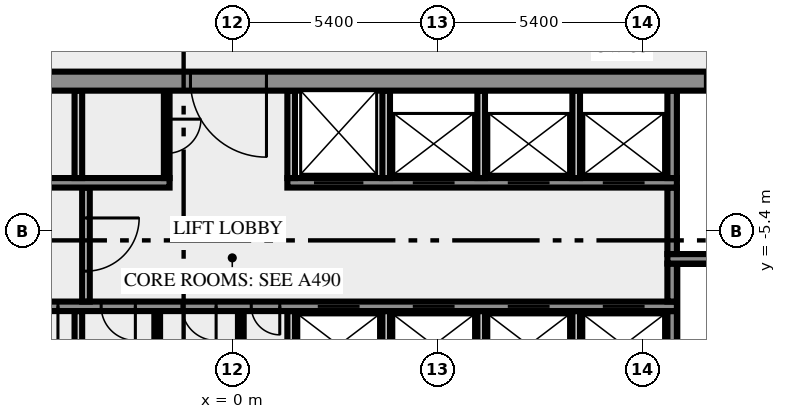
"""IFC4 building model, lengths in metres.
Left out: names, types, materials, properties, quantities, classifications, styles, units other than length and angle.
Written with IfcOpenShell. Run it as: python <this file> out.ifc"""

import sys

from ifc_helpers import new_model, si_unit, direction, frame, frame_2d, origin, place, context, subcontext, project, spatial, rectangle, extrude, element, fill, save


model = new_model("IFC4")
c1 = context("Model", 3, precision=1e-05, world=origin(), true_north=direction((0.0, 1.0)))
c2 = subcontext(c1, "Body", "Model", "MODEL_VIEW")
j1 = project(units=[si_unit("LENGTHUNIT", "METRE"), si_unit("PLANEANGLEUNIT", "RADIAN")], contexts=[c1])
p1 = place(None, origin())
s1 = spatial("IfcSite", under=j1, at=p1, CompositionType="ELEMENT")
p2 = place(p1, origin())
s2 = spatial("IfcBuilding", under=s1, at=p2, CompositionType="ELEMENT")
p3 = place(p2, frame((0.0, 0.0, 194.0)))
s3 = spatial("IfcBuildingStorey", under=s2, at=p3, CompositionType="ELEMENT", Elevation=194.0)
p4 = place(p3, frame((-4.05, -10.5, 0.0), z_axis=(0.0, 0.0, 1.0), x_axis=(0.0, 1.0, 0.0)))
e1 = element("IfcWall", 1, at=p4, inside=s3, PredefinedType="SOLIDWALL", context=c2, shape_type="SweptSolid", body=[
    extrude(rectangle(XDim=3.0, YDim=0.2, at=frame_2d((1.5, 0.0))), origin(), (0.0, 0.0, 1.0), 3.65),
])
for number, where, z_axis, x_axis in (
    (2, (-1.975, -10.5, 0.0), (0.0, 0.0, 1.0), (0.0, 1.0, 0.0)),
    (3, (0.225, -10.5, 0.0), (0.0, 0.0, 1.0), (0.0, 1.0, 0.0)),
):
    element("IfcWall", number, at=place(p3, frame(where, z_axis=z_axis, x_axis=x_axis)), inside=s3, PredefinedType="PARTITIONING", context=c2, shape_type="SweptSolid", body=[
        extrude(rectangle(XDim=3.0, YDim=0.15, at=frame_2d((1.5, 0.0))), origin(), (0.0, 0.0, 1.0), 3.65),
    ])
for number, where, z_axis, x_axis in (
    (4, (1.55, -10.5, 0.0), (0.0, 0.0, 1.0), (0.0, 1.0, 0.0)),
    (5, (4.05, -10.5, 0.0), (0.0, 0.0, 1.0), (0.0, 1.0, 0.0)),
    (6, (6.55, -10.5, 0.0), (0.0, 0.0, 1.0), (0.0, 1.0, 0.0)),
    (7, (9.05, -10.5, 0.0), (0.0, 0.0, 1.0), (0.0, 1.0, 0.0)),
):
    element("IfcWall", number, at=place(p3, frame(where, z_axis=z_axis, x_axis=x_axis)), inside=s3, PredefinedType="SOLIDWALL", context=c2, shape_type="SweptSolid", body=[
        extrude(rectangle(XDim=3.0, YDim=0.2, at=frame_2d((1.5, 0.0))), origin(), (0.0, 0.0, 1.0), 3.65),
    ])
p5 = place(p3, frame((11.575, -10.5, 0.0), z_axis=(0.0, 0.0, 1.0), x_axis=(0.0, 1.0, 0.0)))
e8 = element("IfcWall", 8, at=p5, inside=s3, PredefinedType="SHEAR", context=c2, shape_type="SweptSolid", body=[
    extrude(rectangle(XDim=3.0, YDim=0.25, at=frame_2d((1.5, 0.0))), origin(), (0.0, 0.0, 1.0), 3.65),
])
p6 = place(p3, frame((11.7, -7.375, 0.0), z_axis=(0.0, 0.0, 1.0), x_axis=(-1.0, 0.0, 0.0)))
e9 = element("IfcWall", 9, at=p6, inside=s3, PredefinedType="SHEAR", context=c2, shape_type="SweptSolid", body=[
    extrude(rectangle(XDim=23.4, YDim=0.25, at=frame_2d((11.7, 0.0))), origin(), (0.0, 0.0, 1.0), 3.65),
])
p7 = place(p6, frame((22.012, 0.0, 0.0)))
e10 = element("IfcOpeningElement", 10, at=p7, cuts=e9, PredefinedType="OPENING", context=c2, shape_type="SweptSolid", body=[
    extrude(rectangle(XDim=0.9, YDim=2.1, at=frame_2d((0.45, 1.05))), frame((0.0, 0.135, 0.0), z_axis=(0.0, -1.0, 0.0), x_axis=(1.0, 0.0, 0.0)), (0.0, 0.0, 1.0), 0.27),
])
p8 = place(p6, frame((20.25, 0.0, 0.0)))
e11 = element("IfcOpeningElement", 11, at=p8, cuts=e9, PredefinedType="OPENING", context=c2, shape_type="SweptSolid", body=[
    extrude(rectangle(XDim=0.9, YDim=2.1, at=frame_2d((0.45, 1.05))), frame((0.0, 0.135, 0.0), z_axis=(0.0, -1.0, 0.0), x_axis=(1.0, 0.0, 0.0)), (0.0, 0.0, 1.0), 0.27),
])
p9 = place(p6, frame((18.25, 0.0, 0.0)))
e12 = element("IfcOpeningElement", 12, at=p9, cuts=e9, PredefinedType="OPENING", context=c2, shape_type="SweptSolid", body=[
    extrude(rectangle(XDim=0.9, YDim=2.1, at=frame_2d((0.45, 1.05))), frame((0.0, 0.135, 0.0), z_axis=(0.0, -1.0, 0.0), x_axis=(1.0, 0.0, 0.0)), (0.0, 0.0, 1.0), 0.27),
])
p10 = place(p6, frame((16.287, 0.0, 0.0)))
e13 = element("IfcOpeningElement", 13, at=p10, cuts=e9, PredefinedType="OPENING", context=c2, shape_type="SweptSolid", body=[
    extrude(rectangle(XDim=0.9, YDim=2.1, at=frame_2d((0.45, 1.05))), frame((0.0, 0.135, 0.0), z_axis=(0.0, -1.0, 0.0), x_axis=(1.0, 0.0, 0.0)), (0.0, 0.0, 1.0), 0.27),
])
p11 = place(p6, frame((14.25, 0.0, 0.0)))
e14 = element("IfcOpeningElement", 14, at=p11, cuts=e9, PredefinedType="OPENING", context=c2, shape_type="SweptSolid", body=[
    extrude(rectangle(XDim=0.9, YDim=2.1, at=frame_2d((0.45, 1.05))), frame((0.0, 0.135, 0.0), z_axis=(0.0, -1.0, 0.0), x_axis=(1.0, 0.0, 0.0)), (0.0, 0.0, 1.0), 0.27),
])
p12 = place(p6, frame((12.125, 0.0, 0.0)))
e15 = element("IfcOpeningElement", 15, at=p12, cuts=e9, PredefinedType="OPENING", context=c2, shape_type="SweptSolid", body=[
    extrude(rectangle(XDim=0.9, YDim=2.1, at=frame_2d((0.45, 1.05))), frame((0.0, 0.135, 0.0), z_axis=(0.0, -1.0, 0.0), x_axis=(1.0, 0.0, 0.0)), (0.0, 0.0, 1.0), 0.27),
])
p13 = place(p6, frame((10.45, 0.0, 0.0)))
e16 = element("IfcOpeningElement", 16, at=p13, cuts=e9, PredefinedType="OPENING", context=c2, shape_type="SweptSolid", body=[
    extrude(rectangle(XDim=0.75, YDim=2.1, at=frame_2d((0.375, 1.05))), frame((0.0, 0.135, 0.0), z_axis=(0.0, -1.0, 0.0), x_axis=(1.0, 0.0, 0.0)), (0.0, 0.0, 1.0), 0.27),
])
p14 = place(p6, frame((8.35, 0.0, 0.0)))
e17 = element("IfcOpeningElement", 17, at=p14, cuts=e9, PredefinedType="OPENING", context=c2, shape_type="SweptSolid", body=[
    extrude(rectangle(XDim=1.1, YDim=2.1, at=frame_2d((0.55, 1.05))), frame((0.0, 0.135, 0.0), z_axis=(0.0, -1.0, 0.0), x_axis=(1.0, 0.0, 0.0)), (0.0, 0.0, 1.0), 0.27),
])
p15 = place(p6, frame((5.85, 0.0, 0.0)))
e18 = element("IfcOpeningElement", 18, at=p15, cuts=e9, PredefinedType="OPENING", context=c2, shape_type="SweptSolid", body=[
    extrude(rectangle(XDim=1.1, YDim=2.1, at=frame_2d((0.55, 1.05))), frame((0.0, 0.135, 0.0), z_axis=(0.0, -1.0, 0.0), x_axis=(1.0, 0.0, 0.0)), (0.0, 0.0, 1.0), 0.27),
])
p16 = place(p6, frame((3.35, 0.0, 0.0)))
e19 = element("IfcOpeningElement", 19, at=p16, cuts=e9, PredefinedType="OPENING", context=c2, shape_type="SweptSolid", body=[
    extrude(rectangle(XDim=1.1, YDim=2.1, at=frame_2d((0.55, 1.05))), frame((0.0, 0.135, 0.0), z_axis=(0.0, -1.0, 0.0), x_axis=(1.0, 0.0, 0.0)), (0.0, 0.0, 1.0), 0.27),
])
p17 = place(p6, frame((0.85, 0.0, 0.0)))
e20 = element("IfcOpeningElement", 20, at=p17, cuts=e9, PredefinedType="OPENING", context=c2, shape_type="SweptSolid", body=[
    extrude(rectangle(XDim=1.1, YDim=2.1, at=frame_2d((0.55, 1.05))), frame((0.0, 0.135, 0.0), z_axis=(0.0, -1.0, 0.0), x_axis=(1.0, 0.0, 0.0)), (0.0, 0.0, 1.0), 0.27),
])
p18 = place(p3, frame((-3.85, -4.25, 0.0), z_axis=(0.0, 0.0, 1.0), x_axis=(0.0, -1.0, 0.0)))
e21 = element("IfcWall", 21, at=p18, inside=s3, PredefinedType="SOLIDWALL", context=c2, shape_type="SweptSolid", body=[
    extrude(rectangle(XDim=3.0, YDim=0.2, at=frame_2d((1.5, 0.0))), origin(), (0.0, 0.0, 1.0), 3.65),
])
p19 = place(p18, frame((0.8, 0.0, 0.0)))
e22 = element("IfcOpeningElement", 22, at=p19, cuts=e21, PredefinedType="OPENING", context=c2, shape_type="SweptSolid", body=[
    extrude(rectangle(XDim=1.4, YDim=2.1, at=frame_2d((0.7, 1.05))), frame((0.0, 0.11, 0.0), z_axis=(0.0, -1.0, 0.0), x_axis=(1.0, 0.0, 0.0)), (0.0, 0.0, 1.0), 0.22),
])
p20 = place(p3, frame((11.575, -7.25, 0.0), z_axis=(0.0, 0.0, 1.0), x_axis=(0.0, 1.0, 0.0)))
e23 = element("IfcWall", 23, at=p20, inside=s3, PredefinedType="SHEAR", context=c2, shape_type="SweptSolid", body=[
    extrude(rectangle(XDim=1.0, YDim=0.25, at=frame_2d((0.5, 0.0))), origin(), (0.0, 0.0, 1.0), 3.65),
])
p21 = place(p3, frame((19.5, -6.125, 0.0), z_axis=(0.0, 0.0, 1.0), x_axis=(-1.0, 0.0, 0.0)))
e24 = element("IfcWall", 24, at=p21, inside=s3, PredefinedType="SHEAR", context=c2, shape_type="SweptSolid", body=[
    extrude(rectangle(XDim=8.05, YDim=0.25, at=frame_2d((4.025, 0.0))), origin(), (0.0, 0.0, 1.0), 3.65),
])
p22 = place(p21, frame((0.05, 0.0, 0.0)))
e25 = element("IfcOpeningElement", 25, at=p22, cuts=e24, PredefinedType="OPENING", context=c2, shape_type="SweptSolid", body=[
    extrude(rectangle(XDim=1.8, YDim=2.1, at=frame_2d((0.9, 1.05))), frame((0.0, 0.135, 0.0), z_axis=(0.0, -1.0, 0.0), x_axis=(1.0, 0.0, 0.0)), (0.0, 0.0, 1.0), 0.27),
])
p23 = place(p3, frame((11.575, -6.0, 0.0), z_axis=(0.0, 0.0, 1.0), x_axis=(0.0, 1.0, 0.0)))
e26 = element("IfcWall", 26, at=p23, inside=s3, PredefinedType="SHEAR", context=c2, shape_type="SweptSolid", body=[
    extrude(rectangle(XDim=1.75, YDim=0.25, at=frame_2d((0.875, 0.0))), origin(), (0.0, 0.0, 1.0), 3.65),
])
p24 = place(p3, frame((-11.7, -4.125, 0.0), z_axis=(0.0, 0.0, 1.0), x_axis=(1.0, 0.0, 0.0)))
e27 = element("IfcWall", 27, at=p24, inside=s3, PredefinedType="SHEAR", context=c2, shape_type="SweptSolid", body=[
    extrude(rectangle(XDim=10.05, YDim=0.25, at=frame_2d((5.025, 0.0))), origin(), (0.0, 0.0, 1.0), 3.65),
])
p25 = place(p3, frame((1.45, -4.125, 0.0), z_axis=(0.0, 0.0, 1.0), x_axis=(1.0, 0.0, 0.0)))
e28 = element("IfcWall", 28, at=p25, inside=s3, PredefinedType="SHEAR", context=c2, shape_type="SweptSolid", body=[
    extrude(rectangle(XDim=10.25, YDim=0.25, at=frame_2d((5.125, 0.0))), origin(), (0.0, 0.0, 1.0), 3.65),
])
p26 = place(p25, frame((0.7, 0.0, 0.0)))
e29 = element("IfcOpeningElement", 29, at=p26, cuts=e28, PredefinedType="OPENING", context=c2, shape_type="SweptSolid", body=[
    extrude(rectangle(XDim=1.3, YDim=2.1, at=frame_2d((0.65, 1.05))), frame((0.0, 0.135, 0.0), z_axis=(0.0, -1.0, 0.0), x_axis=(1.0, 0.0, 0.0)), (0.0, 0.0, 1.0), 0.27),
])
p27 = place(p25, frame((3.3, 0.0, 0.0)))
e30 = element("IfcOpeningElement", 30, at=p27, cuts=e28, PredefinedType="OPENING", context=c2, shape_type="SweptSolid", body=[
    extrude(rectangle(XDim=1.1, YDim=2.1, at=frame_2d((0.55, 1.05))), frame((0.0, 0.135, 0.0), z_axis=(0.0, -1.0, 0.0), x_axis=(1.0, 0.0, 0.0)), (0.0, 0.0, 1.0), 0.27),
])
p28 = place(p25, frame((5.8, 0.0, 0.0)))
e31 = element("IfcOpeningElement", 31, at=p28, cuts=e28, PredefinedType="OPENING", context=c2, shape_type="SweptSolid", body=[
    extrude(rectangle(XDim=1.1, YDim=2.1, at=frame_2d((0.55, 1.05))), frame((0.0, 0.135, 0.0), z_axis=(0.0, -1.0, 0.0), x_axis=(1.0, 0.0, 0.0)), (0.0, 0.0, 1.0), 0.27),
])
p29 = place(p25, frame((8.3, 0.0, 0.0)))
e32 = element("IfcOpeningElement", 32, at=p29, cuts=e28, PredefinedType="OPENING", context=c2, shape_type="SweptSolid", body=[
    extrude(rectangle(XDim=1.1, YDim=2.1, at=frame_2d((0.55, 1.05))), frame((0.0, 0.135, 0.0), z_axis=(0.0, -1.0, 0.0), x_axis=(1.0, 0.0, 0.0)), (0.0, 0.0, 1.0), 0.27),
])
p30 = place(p3, frame((-4.05, -4.0, 0.0), z_axis=(0.0, 0.0, 1.0), x_axis=(0.0, 1.0, 0.0)))
e33 = element("IfcWall", 33, at=p30, inside=s3, PredefinedType="SOLIDWALL", context=c2, shape_type="SweptSolid", body=[
    extrude(rectangle(XDim=2.3, YDim=0.2, at=frame_2d((1.15, 0.0))), origin(), (0.0, 0.0, 1.0), 3.65),
])
p31 = place(p3, frame((-1.725, -1.7, 0.0), z_axis=(0.0, 0.0, 1.0), x_axis=(0.0, -1.0, 0.0)))
e34 = element("IfcWall", 34, at=p31, inside=s3, PredefinedType="PARTITIONING", context=c2, shape_type="SweptSolid", body=[
    extrude(rectangle(XDim=2.3, YDim=0.15, at=frame_2d((1.15, 0.0))), origin(), (0.0, 0.0, 1.0), 3.65),
])
p32 = place(p31, frame((0.75, 0.0, 0.0)))
e35 = element("IfcOpeningElement", 35, at=p32, cuts=e34, PredefinedType="OPENING", context=c2, shape_type="SweptSolid", body=[
    extrude(rectangle(XDim=0.9, YDim=2.1, at=frame_2d((0.45, 1.05))), frame((0.0, 0.085, 0.0), z_axis=(0.0, -1.0, 0.0), x_axis=(1.0, 0.0, 0.0)), (0.0, 0.0, 1.0), 0.17),
])
for number, where, z_axis, x_axis in (
    (36, (1.55, -4.0, 0.0), (0.0, 0.0, 1.0), (0.0, 1.0, 0.0)),
    (37, (4.05, -4.0, 0.0), (0.0, 0.0, 1.0), (0.0, 1.0, 0.0)),
    (38, (6.55, -4.0, 0.0), (0.0, 0.0, 1.0), (0.0, 1.0, 0.0)),
    (39, (9.05, -4.0, 0.0), (0.0, 0.0, 1.0), (0.0, 1.0, 0.0)),
):
    element("IfcWall", number, at=place(p3, frame(where, z_axis=z_axis, x_axis=x_axis)), inside=s3, PredefinedType="SOLIDWALL", context=c2, shape_type="SweptSolid", body=[
        extrude(rectangle(XDim=2.3, YDim=0.2, at=frame_2d((1.15, 0.0))), origin(), (0.0, 0.0, 1.0), 3.65),
    ])
p33 = place(p3, frame((11.575, -4.0, 0.0), z_axis=(0.0, 0.0, 1.0), x_axis=(0.0, 1.0, 0.0)))
e40 = element("IfcWall", 40, at=p33, inside=s3, PredefinedType="SHEAR", context=c2, shape_type="SweptSolid", body=[
    extrude(rectangle(XDim=2.3, YDim=0.25, at=frame_2d((1.15, 0.0))), origin(), (0.0, 0.0, 1.0), 3.65),
])
p34 = place(p3, frame((20.49, -1.45, 0.0), z_axis=(0.0, 0.0, 1.0), x_axis=(-1.0, 0.0, 0.0)))
e41 = element("IfcWall", 41, at=p34, inside=s3, PredefinedType="SHEAR", context=c2, shape_type="SweptSolid", body=[
    extrude(rectangle(XDim=40.98, YDim=0.5, at=frame_2d((20.49, 0.0))), origin(), (0.0, 0.0, 1.0), 3.65),
])
p35 = place(p34, frame((38.14, 0.0, 0.0)))
e42 = element("IfcOpeningElement", 42, at=p35, cuts=e41, PredefinedType="OPENING", context=c2, shape_type="SweptSolid", body=[
    extrude(rectangle(XDim=1.8, YDim=2.1, at=frame_2d((0.9, 1.05))), frame((0.0, 0.26, 0.0), z_axis=(0.0, -1.0, 0.0), x_axis=(1.0, 0.0, 0.0)), (0.0, 0.0, 1.0), 0.52),
])
p36 = place(p34, frame((35.89, 0.0, 0.0)))
e43 = element("IfcOpeningElement", 43, at=p36, cuts=e41, PredefinedType="OPENING", context=c2, shape_type="SweptSolid", body=[
    extrude(rectangle(XDim=0.9, YDim=2.1, at=frame_2d((0.45, 1.05))), frame((0.0, 0.26, 0.0), z_axis=(0.0, -1.0, 0.0), x_axis=(1.0, 0.0, 0.0)), (0.0, 0.0, 1.0), 0.52),
])
p37 = place(p34, frame((32.94, 0.0, 0.0)))
e44 = element("IfcOpeningElement", 44, at=p37, cuts=e41, PredefinedType="OPENING", context=c2, shape_type="SweptSolid", body=[
    extrude(rectangle(XDim=0.9, YDim=2.1, at=frame_2d((0.45, 1.05))), frame((0.0, 0.26, 0.0), z_axis=(0.0, -1.0, 0.0), x_axis=(1.0, 0.0, 0.0)), (0.0, 0.0, 1.0), 0.52),
])
p38 = place(p34, frame((30.302, 0.0, 0.0)))
e45 = element("IfcOpeningElement", 45, at=p38, cuts=e41, PredefinedType="OPENING", context=c2, shape_type="SweptSolid", body=[
    extrude(rectangle(XDim=0.9, YDim=2.1, at=frame_2d((0.45, 1.05))), frame((0.0, 0.26, 0.0), z_axis=(0.0, -1.0, 0.0), x_axis=(1.0, 0.0, 0.0)), (0.0, 0.0, 1.0), 0.52),
])
p39 = place(p34, frame((26.577, 0.0, 0.0)))
e46 = element("IfcOpeningElement", 46, at=p39, cuts=e41, PredefinedType="OPENING", context=c2, shape_type="SweptSolid", body=[
    extrude(rectangle(XDim=0.9, YDim=2.1, at=frame_2d((0.45, 1.05))), frame((0.0, 0.26, 0.0), z_axis=(0.0, -1.0, 0.0), x_axis=(1.0, 0.0, 0.0)), (0.0, 0.0, 1.0), 0.52),
])
p40 = place(p34, frame((19.59, 0.0, 0.0)))
e47 = element("IfcOpeningElement", 47, at=p40, cuts=e41, PredefinedType="OPENING", context=c2, shape_type="SweptSolid", body=[
    extrude(rectangle(XDim=2.0, YDim=2.1, at=frame_2d((1.0, 1.05))), frame((0.0, 0.26, 0.0), z_axis=(0.0, -1.0, 0.0), x_axis=(1.0, 0.0, 0.0)), (0.0, 0.0, 1.0), 0.52),
])
p41 = place(p34, frame((7.14, 0.0, 0.0)))
e48 = element("IfcOpeningElement", 48, at=p41, cuts=e41, PredefinedType="OPENING", context=c2, shape_type="SweptSolid", body=[
    extrude(rectangle(XDim=0.9, YDim=2.1, at=frame_2d((0.45, 1.05))), frame((0.0, 0.26, 0.0), z_axis=(0.0, -1.0, 0.0), x_axis=(1.0, 0.0, 0.0)), (0.0, 0.0, 1.0), 0.52),
])
p42 = place(p34, frame((5.028, 0.0, 0.0)))
e49 = element("IfcOpeningElement", 49, at=p42, cuts=e41, PredefinedType="OPENING", context=c2, shape_type="SweptSolid", body=[
    extrude(rectangle(XDim=0.8, YDim=2.1, at=frame_2d((0.4, 1.05))), frame((0.0, 0.26, 0.0), z_axis=(0.0, -1.0, 0.0), x_axis=(1.0, 0.0, 0.0)), (0.0, 0.0, 1.0), 0.52),
])
p43 = place(p34, frame((3.452, 0.0, 0.0)))
e50 = element("IfcOpeningElement", 50, at=p43, cuts=e41, PredefinedType="OPENING", context=c2, shape_type="SweptSolid", body=[
    extrude(rectangle(XDim=0.8, YDim=2.1, at=frame_2d((0.4, 1.05))), frame((0.0, 0.26, 0.0), z_axis=(0.0, -1.0, 0.0), x_axis=(1.0, 0.0, 0.0)), (0.0, 0.0, 1.0), 0.52),
])
p44 = place(p34, frame((1.04, 0.0, 0.0)))
e51 = element("IfcOpeningElement", 51, at=p44, cuts=e41, PredefinedType="OPENING", context=c2, shape_type="SweptSolid", body=[
    extrude(rectangle(XDim=1.8, YDim=2.1, at=frame_2d((0.9, 1.05))), frame((0.0, 0.26, 0.0), z_axis=(0.0, -1.0, 0.0), x_axis=(1.0, 0.0, 0.0)), (0.0, 0.0, 1.0), 0.52),
])
p45 = place(p10, origin())
e52 = element("IfcDoor", 52, at=p45, inside=s3, OperationType="SINGLE_SWING_RIGHT", PredefinedType="DOOR", context=c2, shape_type="SweptSolid", body=[
    extrude(rectangle(XDim=0.9, YDim=2.1, at=frame_2d((0.45, 1.05))), frame((0.0, 0.025, 0.0), z_axis=(0.0, -1.0, 0.0), x_axis=(1.0, 0.0, 0.0)), (0.0, 0.0, 1.0), 0.05),
])
fill(e13, e52)
p46 = place(p11, origin())
e53 = element("IfcDoor", 53, at=p46, inside=s3, OperationType="SINGLE_SWING_RIGHT", PredefinedType="DOOR", context=c2, shape_type="SweptSolid", body=[
    extrude(rectangle(XDim=0.9, YDim=2.1, at=frame_2d((0.45, 1.05))), frame((0.0, 0.025, 0.0), z_axis=(0.0, -1.0, 0.0), x_axis=(1.0, 0.0, 0.0)), (0.0, 0.0, 1.0), 0.05),
])
fill(e14, e53)
p47 = place(p12, origin())
e54 = element("IfcDoor", 54, at=p47, inside=s3, OperationType="SINGLE_SWING_RIGHT", PredefinedType="DOOR", context=c2, shape_type="SweptSolid", body=[
    extrude(rectangle(XDim=0.9, YDim=2.1, at=frame_2d((0.45, 1.05))), frame((0.0, 0.025, 0.0), z_axis=(0.0, -1.0, 0.0), x_axis=(1.0, 0.0, 0.0)), (0.0, 0.0, 1.0), 0.05),
])
fill(e15, e54)
p48 = place(p13, origin())
e55 = element("IfcDoor", 55, at=p48, inside=s3, OperationType="SINGLE_SWING_LEFT", PredefinedType="DOOR", context=c2, shape_type="SweptSolid", body=[
    extrude(rectangle(XDim=0.75, YDim=2.1, at=frame_2d((0.375, 1.05))), frame((0.0, 0.025, 0.0), z_axis=(0.0, -1.0, 0.0), x_axis=(1.0, 0.0, 0.0)), (0.0, 0.0, 1.0), 0.05),
])
fill(e16, e55)
p49 = place(p14, origin())
e56 = element("IfcDoor", 56, at=p49, inside=s3, OperationType="DOUBLE_DOOR_SLIDING", PredefinedType="DOOR", context=c2, shape_type="SweptSolid", body=[
    extrude(rectangle(XDim=1.1, YDim=2.1, at=frame_2d((0.55, 1.05))), frame((0.0, 0.025, 0.0), z_axis=(0.0, -1.0, 0.0), x_axis=(1.0, 0.0, 0.0)), (0.0, 0.0, 1.0), 0.05),
])
fill(e17, e56)
p50 = place(p15, origin())
e57 = element("IfcDoor", 57, at=p50, inside=s3, OperationType="DOUBLE_DOOR_SLIDING", PredefinedType="DOOR", context=c2, shape_type="SweptSolid", body=[
    extrude(rectangle(XDim=1.1, YDim=2.1, at=frame_2d((0.55, 1.05))), frame((0.0, 0.025, 0.0), z_axis=(0.0, -1.0, 0.0), x_axis=(1.0, 0.0, 0.0)), (0.0, 0.0, 1.0), 0.05),
])
fill(e18, e57)
p51 = place(p16, origin())
e58 = element("IfcDoor", 58, at=p51, inside=s3, OperationType="DOUBLE_DOOR_SLIDING", PredefinedType="DOOR", context=c2, shape_type="SweptSolid", body=[
    extrude(rectangle(XDim=1.1, YDim=2.1, at=frame_2d((0.55, 1.05))), frame((0.0, 0.025, 0.0), z_axis=(0.0, -1.0, 0.0), x_axis=(1.0, 0.0, 0.0)), (0.0, 0.0, 1.0), 0.05),
])
fill(e19, e58)
p52 = place(p17, origin())
e59 = element("IfcDoor", 59, at=p52, inside=s3, OperationType="DOUBLE_DOOR_SLIDING", PredefinedType="DOOR", context=c2, shape_type="SweptSolid", body=[
    extrude(rectangle(XDim=1.1, YDim=2.1, at=frame_2d((0.55, 1.05))), frame((0.0, 0.025, 0.0), z_axis=(0.0, -1.0, 0.0), x_axis=(1.0, 0.0, 0.0)), (0.0, 0.0, 1.0), 0.05),
])
fill(e20, e59)
p53 = place(p19, origin())
e60 = element("IfcDoor", 60, at=p53, inside=s3, OperationType="DOUBLE_DOOR_SINGLE_SWING", PredefinedType="DOOR", context=c2, shape_type="SweptSolid", body=[
    extrude(rectangle(XDim=1.4, YDim=2.1, at=frame_2d((0.7, 1.05))), frame((0.0, 0.025, 0.0), z_axis=(0.0, -1.0, 0.0), x_axis=(1.0, 0.0, 0.0)), (0.0, 0.0, 1.0), 0.05),
])
fill(e22, e60)
p54 = place(p26, origin())
e61 = element("IfcDoor", 61, at=p54, inside=s3, OperationType="DOUBLE_DOOR_SLIDING", PredefinedType="DOOR", context=c2, shape_type="SweptSolid", body=[
    extrude(rectangle(XDim=1.3, YDim=2.1, at=frame_2d((0.65, 1.05))), frame((0.0, 0.025, 0.0), z_axis=(0.0, -1.0, 0.0), x_axis=(1.0, 0.0, 0.0)), (0.0, 0.0, 1.0), 0.05),
])
fill(e29, e61)
p55 = place(p27, origin())
e62 = element("IfcDoor", 62, at=p55, inside=s3, OperationType="DOUBLE_DOOR_SLIDING", PredefinedType="DOOR", context=c2, shape_type="SweptSolid", body=[
    extrude(rectangle(XDim=1.1, YDim=2.1, at=frame_2d((0.55, 1.05))), frame((0.0, 0.025, 0.0), z_axis=(0.0, -1.0, 0.0), x_axis=(1.0, 0.0, 0.0)), (0.0, 0.0, 1.0), 0.05),
])
fill(e30, e62)
p56 = place(p28, origin())
e63 = element("IfcDoor", 63, at=p56, inside=s3, OperationType="DOUBLE_DOOR_SLIDING", PredefinedType="DOOR", context=c2, shape_type="SweptSolid", body=[
    extrude(rectangle(XDim=1.1, YDim=2.1, at=frame_2d((0.55, 1.05))), frame((0.0, 0.025, 0.0), z_axis=(0.0, -1.0, 0.0), x_axis=(1.0, 0.0, 0.0)), (0.0, 0.0, 1.0), 0.05),
])
fill(e31, e63)
p57 = place(p29, origin())
e64 = element("IfcDoor", 64, at=p57, inside=s3, OperationType="DOUBLE_DOOR_SLIDING", PredefinedType="DOOR", context=c2, shape_type="SweptSolid", body=[
    extrude(rectangle(XDim=1.1, YDim=2.1, at=frame_2d((0.55, 1.05))), frame((0.0, 0.025, 0.0), z_axis=(0.0, -1.0, 0.0), x_axis=(1.0, 0.0, 0.0)), (0.0, 0.0, 1.0), 0.05),
])
fill(e32, e64)
p58 = place(p32, origin())
e65 = element("IfcDoor", 65, at=p58, inside=s3, OperationType="SINGLE_SWING_RIGHT", PredefinedType="DOOR", context=c2, shape_type="SweptSolid", body=[
    extrude(rectangle(XDim=0.9, YDim=2.1, at=frame_2d((0.45, 1.05))), frame((0.0, 0.025, 0.0), z_axis=(0.0, -1.0, 0.0), x_axis=(1.0, 0.0, 0.0)), (0.0, 0.0, 1.0), 0.05),
])
fill(e35, e65)
p59 = place(p40, origin())
e66 = element("IfcDoor", 66, at=p59, inside=s3, OperationType="DOUBLE_DOOR_SINGLE_SWING", PredefinedType="DOOR", context=c2, shape_type="SweptSolid", body=[
    extrude(rectangle(XDim=2.0, YDim=2.1, at=frame_2d((1.0, 1.05))), frame((0.0, 0.025, 0.0), z_axis=(0.0, -1.0, 0.0), x_axis=(1.0, 0.0, 0.0)), (0.0, 0.0, 1.0), 0.05),
])
fill(e47, e66)
save(model, sys.argv[1])
